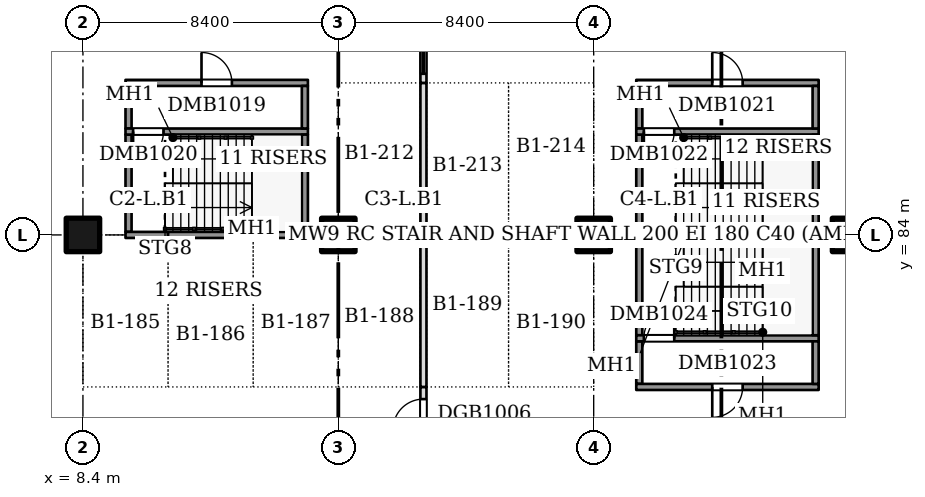
"""IFC4 building model, lengths in metres.
Left out: names, types, materials, properties, quantities, classifications, styles, units other than length and angle.
Written with IfcOpenShell. Run it as: python <this file> out.ifc"""

import sys

from ifc_helpers import new_model, si_unit, direction, frame, frame_2d, origin, origin_2d, place, context, subcontext, project, spatial, rectangle, extrude, element, fill, save


model = new_model("IFC4")
c1 = context("Model", 3, precision=1e-05, world=origin(), true_north=direction((0.0, 1.0)))
c2 = subcontext(c1, "Body", "Model", "MODEL_VIEW")
j1 = project(units=[si_unit("LENGTHUNIT", "METRE"), si_unit("PLANEANGLEUNIT", "RADIAN")], contexts=[c1])
p1 = place(None, origin())
s1 = spatial("IfcSite", under=j1, at=p1, CompositionType="ELEMENT")
p2 = place(p1, origin())
s2 = spatial("IfcBuilding", under=s1, at=p2, CompositionType="ELEMENT")
p3 = place(p2, frame((0.0, 0.0, -4.0)))
s3 = spatial("IfcBuildingStorey", under=s2, at=p3, CompositionType="ELEMENT", Elevation=-4.0)
for number, where, z_axis, x_axis in (
    (1, (8.4, 84.0, 0.0), (0.0, 0.0, 1.0), (1.0, 0.0, 0.0)),
    (2, (16.8, 84.0, 0.0), (0.0, 0.0, 1.0), (1.0, 0.0, 0.0)),
    (3, (25.2, 84.0, 0.0), (0.0, 0.0, 1.0), (1.0, 0.0, 0.0)),
    (4, (33.6, 84.0, 0.0), (0.0, 0.0, 1.0), (1.0, 0.0, 0.0)),
):
    element("IfcColumn", number, at=place(p3, frame(where, z_axis=z_axis, x_axis=x_axis)), inside=s3, PredefinedType="COLUMN", context=c2, shape_type="SweptSolid", body=[
        extrude(rectangle(XDim=1.1, YDim=1.1, at=origin_2d()), origin(), (0.0, 0.0, 1.0), 3.6),
    ])
p4 = place(p3, frame((9.9, 84.1, 0.0), z_axis=(0.0, 0.0, 1.0), x_axis=(0.0, 1.0, 0.0)))
e5 = element("IfcWall", 5, at=p4, inside=s3, PredefinedType="SOLIDWALL", context=c2, shape_type="SweptSolid", body=[
    extrude(rectangle(XDim=3.2, YDim=0.2, at=frame_2d((1.6, 0.0))), origin(), (0.0, 0.0, 1.0), 4.0),
])
for number, where, z_axis, x_axis in (
    (6, (9.8, 84.0, 0.0), (0.0, 0.0, 1.0), (1.0, 0.0, 0.0)),
    (7, (9.9, 87.5, 0.0), (0.0, 0.0, 1.0), (0.0, 1.0, 0.0)),
):
    element("IfcWall", number, at=place(p3, frame(where, z_axis=z_axis, x_axis=x_axis)), inside=s3, PredefinedType="SOLIDWALL", context=c2, shape_type="SweptSolid", body=[
        extrude(rectangle(XDim=1.4, YDim=0.2, at=frame_2d((0.7, 0.0))), origin(), (0.0, 0.0, 1.0), 4.0),
    ])
p5 = place(p3, frame((9.8, 87.4, 0.0), z_axis=(0.0, 0.0, 1.0), x_axis=(1.0, 0.0, 0.0)))
e8 = element("IfcWall", 8, at=p5, inside=s3, PredefinedType="SOLIDWALL", context=c2, shape_type="SweptSolid", body=[
    extrude(rectangle(XDim=6.0, YDim=0.2, at=frame_2d((3.0, 0.0))), origin(), (0.0, 0.0, 1.0), 4.0),
])
p6 = place(p5, frame((0.25, 0.0, 0.0)))
e9 = element("IfcOpeningElement", 9, at=p6, cuts=e8, PredefinedType="OPENING", context=c2, shape_type="SweptSolid", body=[
    extrude(rectangle(XDim=1.0, YDim=2.1, at=frame_2d((0.5, 1.05))), frame((0.0, 0.11, 0.0), z_axis=(0.0, -1.0, 0.0), x_axis=(1.0, 0.0, 0.0)), (0.0, 0.0, 1.0), 0.22),
])
p7 = place(p3, frame((9.8, 89.0, 0.0), z_axis=(0.0, 0.0, 1.0), x_axis=(1.0, 0.0, 0.0)))
e10 = element("IfcWall", 10, at=p7, inside=s3, PredefinedType="SOLIDWALL", context=c2, shape_type="SweptSolid", body=[
    extrude(rectangle(XDim=6.0, YDim=0.2, at=frame_2d((3.0, 0.0))), origin(), (0.0, 0.0, 1.0), 4.0),
])
p8 = place(p7, frame((2.5, 0.0, 0.0)))
e11 = element("IfcOpeningElement", 11, at=p8, cuts=e10, PredefinedType="OPENING", context=c2, shape_type="SweptSolid", body=[
    extrude(rectangle(XDim=1.0, YDim=2.1, at=frame_2d((0.5, 1.05))), frame((0.0, 0.11, 0.0), z_axis=(0.0, -1.0, 0.0), x_axis=(1.0, 0.0, 0.0)), (0.0, 0.0, 1.0), 0.22),
])
p9 = place(p3, frame((11.2, 84.0, 0.0), z_axis=(0.0, 0.0, 1.0), x_axis=(1.0, 0.0, 0.0)))
e12 = element("IfcWall", 12, at=p9, inside=s3, PredefinedType="SOLIDWALL", context=c2, shape_type="SweptSolid", body=[
    extrude(rectangle(XDim=2.8, YDim=0.2, at=frame_2d((1.4, 0.0))), origin(), (0.0, 0.0, 1.0), 4.0),
])
p10 = place(p3, frame((14.0, 84.0, 0.0), z_axis=(0.0, 0.0, 1.0), x_axis=(1.0, 0.0, 0.0)))
e13 = element("IfcWall", 13, at=p10, inside=s3, PredefinedType="SOLIDWALL", context=c2, shape_type="SweptSolid", body=[
    extrude(rectangle(XDim=2.25, YDim=0.2, at=frame_2d((1.125, 0.0))), origin(), (0.0, 0.0, 1.0), 4.0),
])
p11 = place(p3, frame((15.7, 84.1, 0.0), z_axis=(0.0, 0.0, 1.0), x_axis=(0.0, 1.0, 0.0)))
e14 = element("IfcWall", 14, at=p11, inside=s3, PredefinedType="SOLIDWALL", context=c2, shape_type="SweptSolid", body=[
    extrude(rectangle(XDim=3.2, YDim=0.2, at=frame_2d((1.6, 0.0))), origin(), (0.0, 0.0, 1.0), 4.0),
])
for number, where, z_axis, x_axis in (
    (15, (15.7, 87.5, 0.0), (0.0, 0.0, 1.0), (0.0, 1.0, 0.0)),
    (16, (26.7, 79.1, 0.0), (0.0, 0.0, 1.0), (0.0, 1.0, 0.0)),
):
    element("IfcWall", number, at=place(p3, frame(where, z_axis=z_axis, x_axis=x_axis)), inside=s3, PredefinedType="SOLIDWALL", context=c2, shape_type="SweptSolid", body=[
        extrude(rectangle(XDim=1.4, YDim=0.2, at=frame_2d((0.7, 0.0))), origin(), (0.0, 0.0, 1.0), 4.0),
    ])
p12 = place(p3, frame((26.6, 79.0, 0.0), z_axis=(0.0, 0.0, 1.0), x_axis=(1.0, 0.0, 0.0)))
e17 = element("IfcWall", 17, at=p12, inside=s3, PredefinedType="SOLIDWALL", context=c2, shape_type="SweptSolid", body=[
    extrude(rectangle(XDim=6.0, YDim=0.2, at=frame_2d((3.0, 0.0))), origin(), (0.0, 0.0, 1.0), 4.0),
])
p13 = place(p12, frame((2.5, 0.0, 0.0)))
e18 = element("IfcOpeningElement", 18, at=p13, cuts=e17, PredefinedType="OPENING", context=c2, shape_type="SweptSolid", body=[
    extrude(rectangle(XDim=1.0, YDim=2.1, at=frame_2d((0.5, 1.05))), frame((0.0, 0.11, 0.0), z_axis=(0.0, -1.0, 0.0), x_axis=(1.0, 0.0, 0.0)), (0.0, 0.0, 1.0), 0.22),
])
p14 = place(p3, frame((26.7, 80.7, 0.0), z_axis=(0.0, 0.0, 1.0), x_axis=(0.0, 1.0, 0.0)))
e19 = element("IfcWall", 19, at=p14, inside=s3, PredefinedType="SOLIDWALL", context=c2, shape_type="SweptSolid", body=[
    extrude(rectangle(XDim=3.2, YDim=0.2, at=frame_2d((1.6, 0.0))), origin(), (0.0, 0.0, 1.0), 4.0),
])
p15 = place(p3, frame((26.6, 80.6, 0.0), z_axis=(0.0, 0.0, 1.0), x_axis=(1.0, 0.0, 0.0)))
e20 = element("IfcWall", 20, at=p15, inside=s3, PredefinedType="SOLIDWALL", context=c2, shape_type="SweptSolid", body=[
    extrude(rectangle(XDim=6.0, YDim=0.2, at=frame_2d((3.0, 0.0))), origin(), (0.0, 0.0, 1.0), 4.0),
])
p16 = place(p15, frame((0.25, 0.0, 0.0)))
e21 = element("IfcOpeningElement", 21, at=p16, cuts=e20, PredefinedType="OPENING", context=c2, shape_type="SweptSolid", body=[
    extrude(rectangle(XDim=1.0, YDim=2.1, at=frame_2d((0.5, 1.05))), frame((0.0, 0.11, 0.0), z_axis=(0.0, -1.0, 0.0), x_axis=(1.0, 0.0, 0.0)), (0.0, 0.0, 1.0), 0.22),
])
p17 = place(p3, frame((26.7, 84.1, 0.0), z_axis=(0.0, 0.0, 1.0), x_axis=(0.0, 1.0, 0.0)))
e22 = element("IfcWall", 22, at=p17, inside=s3, PredefinedType="SOLIDWALL", context=c2, shape_type="SweptSolid", body=[
    extrude(rectangle(XDim=3.2, YDim=0.2, at=frame_2d((1.6, 0.0))), origin(), (0.0, 0.0, 1.0), 4.0),
])
p18 = place(p3, frame((26.6, 84.0, 0.0), z_axis=(0.0, 0.0, 1.0), x_axis=(1.0, 0.0, 0.0)))
e23 = element("IfcWall", 23, at=p18, inside=s3, PredefinedType="SOLIDWALL", context=c2, shape_type="SweptSolid", body=[
    extrude(rectangle(XDim=6.45, YDim=0.2, at=frame_2d((3.225, 0.0))), origin(), (0.0, 0.0, 1.0), 4.0),
])
p19 = place(p3, frame((26.7, 87.5, 0.0), z_axis=(0.0, 0.0, 1.0), x_axis=(0.0, 1.0, 0.0)))
e24 = element("IfcWall", 24, at=p19, inside=s3, PredefinedType="SOLIDWALL", context=c2, shape_type="SweptSolid", body=[
    extrude(rectangle(XDim=1.4, YDim=0.2, at=frame_2d((0.7, 0.0))), origin(), (0.0, 0.0, 1.0), 4.0),
])
p20 = place(p3, frame((26.6, 87.4, 0.0), z_axis=(0.0, 0.0, 1.0), x_axis=(1.0, 0.0, 0.0)))
e25 = element("IfcWall", 25, at=p20, inside=s3, PredefinedType="SOLIDWALL", context=c2, shape_type="SweptSolid", body=[
    extrude(rectangle(XDim=6.0, YDim=0.2, at=frame_2d((3.0, 0.0))), origin(), (0.0, 0.0, 1.0), 4.0),
])
p21 = place(p20, frame((0.25, 0.0, 0.0)))
e26 = element("IfcOpeningElement", 26, at=p21, cuts=e25, PredefinedType="OPENING", context=c2, shape_type="SweptSolid", body=[
    extrude(rectangle(XDim=1.0, YDim=2.1, at=frame_2d((0.5, 1.05))), frame((0.0, 0.11, 0.0), z_axis=(0.0, -1.0, 0.0), x_axis=(1.0, 0.0, 0.0)), (0.0, 0.0, 1.0), 0.22),
])
p22 = place(p3, frame((26.6, 89.0, 0.0), z_axis=(0.0, 0.0, 1.0), x_axis=(1.0, 0.0, 0.0)))
e27 = element("IfcWall", 27, at=p22, inside=s3, PredefinedType="SOLIDWALL", context=c2, shape_type="SweptSolid", body=[
    extrude(rectangle(XDim=6.0, YDim=0.2, at=frame_2d((3.0, 0.0))), origin(), (0.0, 0.0, 1.0), 4.0),
])
p23 = place(p22, frame((2.5, 0.0, 0.0)))
e28 = element("IfcOpeningElement", 28, at=p23, cuts=e27, PredefinedType="OPENING", context=c2, shape_type="SweptSolid", body=[
    extrude(rectangle(XDim=1.0, YDim=2.1, at=frame_2d((0.5, 1.05))), frame((0.0, 0.11, 0.0), z_axis=(0.0, -1.0, 0.0), x_axis=(1.0, 0.0, 0.0)), (0.0, 0.0, 1.0), 0.22),
])
p24 = place(p3, frame((32.5, 79.1, 0.0), z_axis=(0.0, 0.0, 1.0), x_axis=(0.0, 1.0, 0.0)))
e29 = element("IfcWall", 29, at=p24, inside=s3, PredefinedType="SOLIDWALL", context=c2, shape_type="SweptSolid", body=[
    extrude(rectangle(XDim=1.4, YDim=0.2, at=frame_2d((0.7, 0.0))), origin(), (0.0, 0.0, 1.0), 4.0),
])
for number, where, z_axis, x_axis in (
    (30, (32.5, 80.7, 0.0), (0.0, 0.0, 1.0), (0.0, 1.0, 0.0)),
    (31, (32.5, 84.1, 0.0), (0.0, 0.0, 1.0), (0.0, 1.0, 0.0)),
):
    element("IfcWall", number, at=place(p3, frame(where, z_axis=z_axis, x_axis=x_axis)), inside=s3, PredefinedType="SOLIDWALL", context=c2, shape_type="SweptSolid", body=[
        extrude(rectangle(XDim=3.2, YDim=0.2, at=frame_2d((1.6, 0.0))), origin(), (0.0, 0.0, 1.0), 4.0),
    ])
p25 = place(p3, frame((32.5, 87.5, 0.0), z_axis=(0.0, 0.0, 1.0), x_axis=(0.0, 1.0, 0.0)))
e32 = element("IfcWall", 32, at=p25, inside=s3, PredefinedType="SOLIDWALL", context=c2, shape_type="SweptSolid", body=[
    extrude(rectangle(XDim=1.4, YDim=0.2, at=frame_2d((0.7, 0.0))), origin(), (0.0, 0.0, 1.0), 4.0),
])
p26 = place(p3, frame((19.6, 72.2, 0.0), z_axis=(0.0, 0.0, 1.0), x_axis=(0.0, 1.0, 0.0)))
e33 = element("IfcWall", 33, at=p26, inside=s3, PredefinedType="PARTITIONING", context=c2, shape_type="SweptSolid", body=[
    extrude(rectangle(XDim=6.8, YDim=0.2, at=frame_2d((3.4, 0.0))), origin(), (0.0, 0.0, 1.0), 3.6),
])
p27 = place(p26, frame((0.3, 0.0, 0.0)))
e34 = element("IfcOpeningElement", 34, at=p27, cuts=e33, PredefinedType="OPENING", context=c2, shape_type="SweptSolid", body=[
    extrude(rectangle(XDim=4.8, YDim=2.4, at=frame_2d((2.4, 1.2))), frame((0.0, 0.11, 0.0), z_axis=(0.0, -1.0, 0.0), x_axis=(1.0, 0.0, 0.0)), (0.0, 0.0, 1.0), 0.22),
])
p28 = place(p26, frame((5.4, 0.0, 0.0)))
e35 = element("IfcOpeningElement", 35, at=p28, cuts=e33, PredefinedType="OPENING", context=c2, shape_type="SweptSolid", body=[
    extrude(rectangle(XDim=1.0, YDim=2.1, at=frame_2d((0.5, 1.05))), frame((0.0, 0.11, 0.0), z_axis=(0.0, -1.0, 0.0), x_axis=(1.0, 0.0, 0.0)), (0.0, 0.0, 1.0), 0.22),
])
p29 = place(p3, frame((19.6, 79.0, 0.0), z_axis=(0.0, 0.0, 1.0), x_axis=(0.0, 1.0, 0.0)))
e36 = element("IfcWall", 36, at=p29, inside=s3, PredefinedType="PARTITIONING", context=c2, shape_type="SweptSolid", body=[
    extrude(rectangle(XDim=10.0, YDim=0.2, at=frame_2d((5.0, 0.0))), origin(), (0.0, 0.0, 1.0), 3.6),
])
p30 = place(p3, frame((19.6, 89.0, 0.0), z_axis=(0.0, 0.0, 1.0), x_axis=(0.0, 1.0, 0.0)))
e37 = element("IfcWall", 37, at=p30, inside=s3, PredefinedType="PARTITIONING", context=c2, shape_type="SweptSolid", body=[
    extrude(rectangle(XDim=6.8, YDim=0.2, at=frame_2d((3.4, 0.0))), origin(), (0.0, 0.0, 1.0), 3.6),
])
p31 = place(p30, frame((0.3, 0.0, 0.0)))
e38 = element("IfcOpeningElement", 38, at=p31, cuts=e37, PredefinedType="OPENING", context=c2, shape_type="SweptSolid", body=[
    extrude(rectangle(XDim=4.8, YDim=2.4, at=frame_2d((2.4, 1.2))), frame((0.0, 0.11, 0.0), z_axis=(0.0, -1.0, 0.0), x_axis=(1.0, 0.0, 0.0)), (0.0, 0.0, 1.0), 0.22),
])
p32 = place(p30, frame((5.4, 0.0, 0.0)))
e39 = element("IfcOpeningElement", 39, at=p32, cuts=e37, PredefinedType="OPENING", context=c2, shape_type="SweptSolid", body=[
    extrude(rectangle(XDim=1.0, YDim=2.1, at=frame_2d((0.5, 1.05))), frame((0.0, 0.11, 0.0), z_axis=(0.0, -1.0, 0.0), x_axis=(1.0, 0.0, 0.0)), (0.0, 0.0, 1.0), 0.22),
])
p33 = place(p8, origin())
e40 = element("IfcDoor", 40, at=p33, inside=s3, OperationType="SINGLE_SWING_LEFT", PredefinedType="DOOR", context=c2, shape_type="SweptSolid", body=[
    extrude(rectangle(XDim=1.0, YDim=2.1, at=frame_2d((0.5, 1.05))), frame((0.0, 0.025, 0.0), z_axis=(0.0, -1.0, 0.0), x_axis=(1.0, 0.0, 0.0)), (0.0, 0.0, 1.0), 0.05),
])
fill(e11, e40)
p34 = place(p6, frame((1.0, 0.0, 0.0), z_axis=(0.0, 0.0, 1.0), x_axis=(-1.0, 0.0, 0.0)))
e41 = element("IfcDoor", 41, at=p34, inside=s3, OperationType="SINGLE_SWING_RIGHT", PredefinedType="DOOR", context=c2, shape_type="SweptSolid", body=[
    extrude(rectangle(XDim=1.0, YDim=2.1, at=frame_2d((0.5, 1.05))), frame((0.0, 0.025, 0.0), z_axis=(0.0, -1.0, 0.0), x_axis=(1.0, 0.0, 0.0)), (0.0, 0.0, 1.0), 0.05),
])
fill(e9, e41)
p35 = place(p23, origin())
e42 = element("IfcDoor", 42, at=p35, inside=s3, OperationType="SINGLE_SWING_LEFT", PredefinedType="DOOR", context=c2, shape_type="SweptSolid", body=[
    extrude(rectangle(XDim=1.0, YDim=2.1, at=frame_2d((0.5, 1.05))), frame((0.0, 0.025, 0.0), z_axis=(0.0, -1.0, 0.0), x_axis=(1.0, 0.0, 0.0)), (0.0, 0.0, 1.0), 0.05),
])
fill(e28, e42)
p36 = place(p21, frame((1.0, 0.0, 0.0), z_axis=(0.0, 0.0, 1.0), x_axis=(-1.0, 0.0, 0.0)))
e43 = element("IfcDoor", 43, at=p36, inside=s3, OperationType="SINGLE_SWING_RIGHT", PredefinedType="DOOR", context=c2, shape_type="SweptSolid", body=[
    extrude(rectangle(XDim=1.0, YDim=2.1, at=frame_2d((0.5, 1.05))), frame((0.0, 0.025, 0.0), z_axis=(0.0, -1.0, 0.0), x_axis=(1.0, 0.0, 0.0)), (0.0, 0.0, 1.0), 0.05),
])
fill(e26, e43)
p37 = place(p13, frame((1.0, 0.0, 0.0), z_axis=(0.0, 0.0, 1.0), x_axis=(-1.0, 0.0, 0.0)))
e44 = element("IfcDoor", 44, at=p37, inside=s3, OperationType="SINGLE_SWING_RIGHT", PredefinedType="DOOR", context=c2, shape_type="SweptSolid", body=[
    extrude(rectangle(XDim=1.0, YDim=2.1, at=frame_2d((0.5, 1.05))), frame((0.0, 0.025, 0.0), z_axis=(0.0, -1.0, 0.0), x_axis=(1.0, 0.0, 0.0)), (0.0, 0.0, 1.0), 0.05),
])
fill(e18, e44)
p38 = place(p16, origin())
e45 = element("IfcDoor", 45, at=p38, inside=s3, OperationType="SINGLE_SWING_RIGHT", PredefinedType="DOOR", context=c2, shape_type="SweptSolid", body=[
    extrude(rectangle(XDim=1.0, YDim=2.1, at=frame_2d((0.5, 1.05))), frame((0.0, 0.025, 0.0), z_axis=(0.0, -1.0, 0.0), x_axis=(1.0, 0.0, 0.0)), (0.0, 0.0, 1.0), 0.05),
])
fill(e21, e45)
p39 = place(p28, origin())
e46 = element("IfcDoor", 46, at=p39, inside=s3, OperationType="SINGLE_SWING_LEFT", PredefinedType="DOOR", context=c2, shape_type="SweptSolid", body=[
    extrude(rectangle(XDim=1.0, YDim=2.1, at=frame_2d((0.5, 1.05))), frame((0.0, 0.025, 0.0), z_axis=(0.0, -1.0, 0.0), x_axis=(1.0, 0.0, 0.0)), (0.0, 0.0, 1.0), 0.05),
])
fill(e35, e46)
p40 = place(p31, origin())
e47 = element("IfcDoor", 47, at=p40, inside=s3, OperationType="ROLLINGUP", PredefinedType="GATE", context=c2, shape_type="SweptSolid", body=[
    extrude(rectangle(XDim=4.8, YDim=2.4, at=frame_2d((2.4, 1.2))), frame((0.0, 0.025, 0.0), z_axis=(0.0, -1.0, 0.0), x_axis=(1.0, 0.0, 0.0)), (0.0, 0.0, 1.0), 0.05),
])
fill(e38, e47)
save(model, sys.argv[1])
